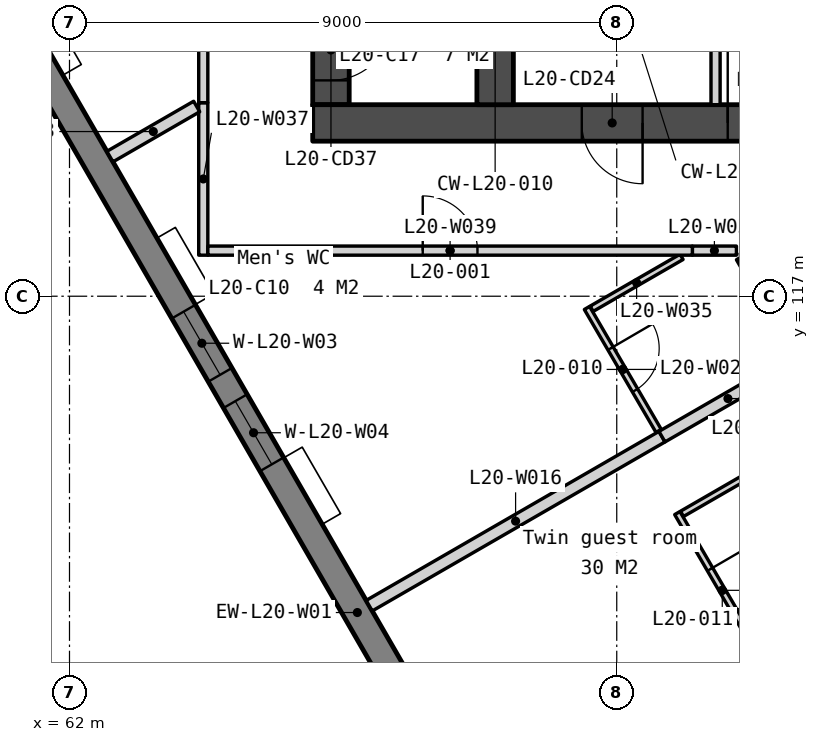
"""IFC4 building model, lengths in metres.
Left out: names, types, materials, properties, quantities, classifications, styles, units other than length and angle.
Written with IfcOpenShell. Run it as: python <this file> out.ifc"""

import sys

from ifc_helpers import new_model, si_unit, direction, frame, frame_2d, origin, place, context, subcontext, project, spatial, polyline, rectangle, outline, extrude, element, fill, save


model = new_model("IFC4")
c1 = context("Model", 3, precision=1e-05, world=origin(), true_north=direction((0.0, 1.0)))
c2 = subcontext(c1, "Body", "Model", "MODEL_VIEW")
j1 = project(units=[si_unit("LENGTHUNIT", "METRE"), si_unit("PLANEANGLEUNIT", "RADIAN")], contexts=[c1])
p1 = place(None, origin())
s1 = spatial("IfcSite", under=j1, at=p1, CompositionType="ELEMENT")
p2 = place(p1, origin())
s2 = spatial("IfcBuilding", under=s1, at=p2, CompositionType="ELEMENT")
p3 = place(p2, frame((0.0, 0.0, 85.3)))
s3 = spatial("IfcBuildingStorey", under=s2, at=p3, CompositionType="ELEMENT", Elevation=85.3)
p4 = place(p3, frame((66.3, 133.95, 0.0), z_axis=(0.0, 0.0, 1.0), x_axis=(0.0, -1.0, 0.0)))
e1 = element("IfcWall", 1, at=p4, inside=s3, PredefinedType="SOLIDWALL", context=c2, shape_type="SweptSolid", body=[
    extrude(rectangle(XDim=13.8, YDim=0.6, at=frame_2d((6.9, 0.0))), origin(), (0.0, 0.0, 1.0), 3.35),
])
p5 = place(p4, frame((0.6, 0.0, 0.0)))
e2 = element("IfcOpeningElement", 2, at=p5, cuts=e1, PredefinedType="OPENING", context=c2, shape_type="SweptSolid", body=[
    extrude(rectangle(XDim=1.1, YDim=2.1, at=frame_2d((0.55, 1.05))), frame((0.0, 0.31, 0.0), z_axis=(0.0, -1.0, 0.0), x_axis=(1.0, 0.0, 0.0)), (0.0, 0.0, 1.0), 0.62),
])
p6 = place(p4, frame((8.405, 0.0, 0.0)))
e3 = element("IfcOpeningElement", 3, at=p6, cuts=e1, PredefinedType="OPENING", context=c2, shape_type="SweptSolid", body=[
    extrude(rectangle(XDim=1.0, YDim=2.1, at=frame_2d((0.5, 1.05))), frame((0.0, 0.31, 0.0), z_axis=(0.0, -1.0, 0.0), x_axis=(1.0, 0.0, 0.0)), (0.0, 0.0, 1.0), 0.62),
])
p7 = place(p4, frame((10.355, 0.0, 0.0)))
e4 = element("IfcOpeningElement", 4, at=p7, cuts=e1, PredefinedType="OPENING", context=c2, shape_type="SweptSolid", body=[
    extrude(rectangle(XDim=1.0, YDim=2.1, at=frame_2d((0.5, 1.05))), frame((0.0, 0.31, 0.0), z_axis=(0.0, -1.0, 0.0), x_axis=(1.0, 0.0, 0.0)), (0.0, 0.0, 1.0), 0.62),
])
p8 = place(p4, frame((12.4, 0.0, 0.0)))
e5 = element("IfcOpeningElement", 5, at=p8, cuts=e1, PredefinedType="OPENING", context=c2, shape_type="SweptSolid", body=[
    extrude(rectangle(XDim=1.0, YDim=2.1, at=frame_2d((0.5, 1.05))), frame((0.0, 0.31, 0.0), z_axis=(0.0, -1.0, 0.0), x_axis=(1.0, 0.0, 0.0)), (0.0, 0.0, 1.0), 0.62),
])
p9 = place(p3, frame((66.0, 119.85, 0.0), z_axis=(0.0, 0.0, 1.0), x_axis=(1.0, 0.0, 0.0)))
e6 = element("IfcWall", 6, at=p9, inside=s3, PredefinedType="SOLIDWALL", context=c2, shape_type="SweptSolid", body=[
    extrude(rectangle(XDim=28.0, YDim=0.6, at=frame_2d((14.0, 0.0))), origin(), (0.0, 0.0, 1.0), 3.35),
])
p10 = place(p9, frame((6.825, 0.0, 0.0)))
e7 = element("IfcOpeningElement", 7, at=p10, cuts=e6, PredefinedType="OPENING", context=c2, shape_type="SweptSolid", body=[
    extrude(rectangle(XDim=1.8, YDim=2.1, at=frame_2d((0.9, 1.05))), frame((0.0, 0.31, 0.0), z_axis=(0.0, -1.0, 0.0), x_axis=(1.0, 0.0, 0.0)), (0.0, 0.0, 1.0), 0.62),
])
p11 = place(p9, frame((15.85, 0.0, 0.0)))
e8 = element("IfcOpeningElement", 8, at=p11, cuts=e6, PredefinedType="OPENING", context=c2, shape_type="SweptSolid", body=[
    extrude(rectangle(XDim=1.5, YDim=2.1, at=frame_2d((0.75, 1.05))), frame((0.0, 0.31, 0.0), z_axis=(0.0, -1.0, 0.0), x_axis=(1.0, 0.0, 0.0)), (0.0, 0.0, 1.0), 0.62),
])
p12 = place(p9, frame((19.375, 0.0, 0.0)))
e9 = element("IfcOpeningElement", 9, at=p12, cuts=e6, PredefinedType="OPENING", context=c2, shape_type="SweptSolid", body=[
    extrude(rectangle(XDim=1.8, YDim=2.1, at=frame_2d((0.9, 1.05))), frame((0.0, 0.31, 0.0), z_axis=(0.0, -1.0, 0.0), x_axis=(1.0, 0.0, 0.0)), (0.0, 0.0, 1.0), 0.62),
])
p13 = place(p9, frame((4.425, 0.0, 0.0)))
e10 = element("IfcOpeningElement", 10, at=p13, cuts=e6, PredefinedType="OPENING", context=c2, shape_type="SweptSolid", body=[
    extrude(rectangle(XDim=1.0, YDim=2.1, at=frame_2d((0.5, 1.05))), frame((0.0, 0.31, 0.0), z_axis=(0.0, -1.0, 0.0), x_axis=(1.0, 0.0, 0.0)), (0.0, 0.0, 1.0), 0.62),
])
p14 = place(p9, frame((9.783, 0.0, 0.0)))
e11 = element("IfcOpeningElement", 11, at=p14, cuts=e6, PredefinedType="OPENING", context=c2, shape_type="SweptSolid", body=[
    extrude(rectangle(XDim=1.0, YDim=2.1, at=frame_2d((0.5, 1.05))), frame((0.0, 0.31, 0.0), z_axis=(0.0, -1.0, 0.0), x_axis=(1.0, 0.0, 0.0)), (0.0, 0.0, 1.0), 0.62),
])
p15 = place(p9, frame((11.525, 0.0, 0.0)))
e12 = element("IfcOpeningElement", 12, at=p15, cuts=e6, PredefinedType="OPENING", context=c2, shape_type="SweptSolid", body=[
    extrude(rectangle(XDim=1.0, YDim=2.1, at=frame_2d((0.5, 1.05))), frame((0.0, 0.31, 0.0), z_axis=(0.0, -1.0, 0.0), x_axis=(1.0, 0.0, 0.0)), (0.0, 0.0, 1.0), 0.62),
])
p16 = place(p9, frame((13.658, 0.0, 0.0)))
e13 = element("IfcOpeningElement", 13, at=p16, cuts=e6, PredefinedType="OPENING", context=c2, shape_type="SweptSolid", body=[
    extrude(rectangle(XDim=1.0, YDim=2.1, at=frame_2d((0.5, 1.05))), frame((0.0, 0.31, 0.0), z_axis=(0.0, -1.0, 0.0), x_axis=(1.0, 0.0, 0.0)), (0.0, 0.0, 1.0), 0.62),
])
p17 = place(p9, frame((21.725, 0.0, 0.0)))
e14 = element("IfcOpeningElement", 14, at=p17, cuts=e6, PredefinedType="OPENING", context=c2, shape_type="SweptSolid", body=[
    extrude(rectangle(XDim=1.0, YDim=2.1, at=frame_2d((0.5, 1.05))), frame((0.0, 0.31, 0.0), z_axis=(0.0, -1.0, 0.0), x_axis=(1.0, 0.0, 0.0)), (0.0, 0.0, 1.0), 0.62),
])
p18 = place(p9, frame((23.425, 0.0, 0.0)))
e15 = element("IfcOpeningElement", 15, at=p18, cuts=e6, PredefinedType="OPENING", context=c2, shape_type="SweptSolid", body=[
    extrude(rectangle(XDim=1.0, YDim=2.1, at=frame_2d((0.5, 1.05))), frame((0.0, 0.31, 0.0), z_axis=(0.0, -1.0, 0.0), x_axis=(1.0, 0.0, 0.0)), (0.0, 0.0, 1.0), 0.62),
])
p19 = place(p3, frame((69.0, 122.25, 0.0), z_axis=(0.0, 0.0, 1.0), x_axis=(0.0, -1.0, 0.0)))
e16 = element("IfcWall", 16, at=p19, inside=s3, PredefinedType="SOLIDWALL", context=c2, shape_type="SweptSolid", body=[
    extrude(rectangle(XDim=2.1, YDim=0.6, at=frame_2d((1.05, 0.0))), origin(), (0.0, 0.0, 1.0), 3.35),
])
p20 = place(p3, frame((72.625, 122.25, 0.0), z_axis=(0.0, 0.0, 1.0), x_axis=(0.0, -1.0, 0.0)))
e17 = element("IfcWall", 17, at=p20, inside=s3, PredefinedType="PARTITIONING", context=c2, shape_type="SweptSolid", body=[
    extrude(rectangle(XDim=2.1, YDim=0.15, at=frame_2d((1.05, 0.0))), origin(), (0.0, 0.0, 1.0), 3.35),
])
p21 = place(p3, frame((56.073, 130.263, -0.15), z_axis=(0.0, 0.0, 1.0), x_axis=(0.500000478905, -0.866025127289, 0.0)))
e18 = element("IfcWall", 18, at=p21, inside=s3, PredefinedType="SOLIDWALL", context=c2, shape_type="SweptSolid", body=[
    extrude(outline(polyline([(42.643, 0.0), (42.643, 3.5), (0.0, 3.5), (0.0, 0.0), (42.643, 0.0)])), frame((0.0, 0.225, 0.0), z_axis=(0.0, -1.0, 0.0), x_axis=(1.0, 0.0, 0.0)), (0.0, 0.0, 1.0), 0.45),
])
p22 = place(p21, frame((7.079, 0.0, 1.05)))
e19 = element("IfcOpeningElement", 19, at=p22, cuts=e18, PredefinedType="OPENING", context=c2, shape_type="SweptSolid", body=[
    extrude(rectangle(XDim=1.2, YDim=1.5, at=frame_2d((0.6, 0.75))), frame((0.0, 0.235, 0.0), z_axis=(0.0, -1.0, 0.0), x_axis=(1.0, 0.0, 0.0)), (0.0, 0.0, 1.0), 0.47),
])
p23 = place(p21, frame((8.779, 0.0, 1.05)))
e20 = element("IfcOpeningElement", 20, at=p23, cuts=e18, PredefinedType="OPENING", context=c2, shape_type="SweptSolid", body=[
    extrude(rectangle(XDim=1.2, YDim=1.5, at=frame_2d((0.6, 0.75))), frame((0.0, 0.235, 0.0), z_axis=(0.0, -1.0, 0.0), x_axis=(1.0, 0.0, 0.0)), (0.0, 0.0, 1.0), 0.47),
])
p24 = place(p21, frame((15.607, 0.0, 1.05)))
e21 = element("IfcOpeningElement", 21, at=p24, cuts=e18, PredefinedType="OPENING", context=c2, shape_type="SweptSolid", body=[
    extrude(rectangle(XDim=1.2, YDim=1.5, at=frame_2d((0.6, 0.75))), frame((0.0, 0.235, 0.0), z_axis=(0.0, -1.0, 0.0), x_axis=(1.0, 0.0, 0.0)), (0.0, 0.0, 1.0), 0.47),
])
p25 = place(p21, frame((17.307, 0.0, 1.05)))
e22 = element("IfcOpeningElement", 22, at=p25, cuts=e18, PredefinedType="OPENING", context=c2, shape_type="SweptSolid", body=[
    extrude(rectangle(XDim=1.2, YDim=1.5, at=frame_2d((0.6, 0.75))), frame((0.0, 0.235, 0.0), z_axis=(0.0, -1.0, 0.0), x_axis=(1.0, 0.0, 0.0)), (0.0, 0.0, 1.0), 0.47),
])
p26 = place(p21, frame((24.136, 0.0, 1.05)))
e23 = element("IfcOpeningElement", 23, at=p26, cuts=e18, PredefinedType="OPENING", context=c2, shape_type="SweptSolid", body=[
    extrude(rectangle(XDim=1.2, YDim=1.5, at=frame_2d((0.6, 0.75))), frame((0.0, 0.235, 0.0), z_axis=(0.0, -1.0, 0.0), x_axis=(1.0, 0.0, 0.0)), (0.0, 0.0, 1.0), 0.47),
])
p27 = place(p21, frame((25.836, 0.0, 1.05)))
e24 = element("IfcOpeningElement", 24, at=p27, cuts=e18, PredefinedType="OPENING", context=c2, shape_type="SweptSolid", body=[
    extrude(rectangle(XDim=1.2, YDim=1.5, at=frame_2d((0.6, 0.75))), frame((0.0, 0.235, 0.0), z_axis=(0.0, -1.0, 0.0), x_axis=(1.0, 0.0, 0.0)), (0.0, 0.0, 1.0), 0.47),
])
p28 = place(p21, frame((32.665, 0.0, 1.05)))
e25 = element("IfcOpeningElement", 25, at=p28, cuts=e18, PredefinedType="OPENING", context=c2, shape_type="SweptSolid", body=[
    extrude(rectangle(XDim=1.2, YDim=1.5, at=frame_2d((0.6, 0.75))), frame((0.0, 0.235, 0.0), z_axis=(0.0, -1.0, 0.0), x_axis=(1.0, 0.0, 0.0)), (0.0, 0.0, 1.0), 0.47),
])
p29 = place(p21, frame((34.365, 0.0, 1.05)))
e26 = element("IfcOpeningElement", 26, at=p29, cuts=e18, PredefinedType="OPENING", context=c2, shape_type="SweptSolid", body=[
    extrude(rectangle(XDim=1.2, YDim=1.5, at=frame_2d((0.6, 0.75))), frame((0.0, 0.235, 0.0), z_axis=(0.0, -1.0, 0.0), x_axis=(1.0, 0.0, 0.0)), (0.0, 0.0, 1.0), 0.47),
])
p30 = place(p3, frame((71.996, 113.434, 0.0), z_axis=(0.0, 0.0, 1.0), x_axis=(0.50282251156, -0.864389681723, 0.0)))
e27 = element("IfcWall", 27, at=p30, inside=s3, PredefinedType="PARTITIONING", context=c2, shape_type="SweptSolid", body=[
    extrude(rectangle(XDim=2.94, YDim=0.1, at=frame_2d((1.47, 0.0))), origin(), (0.0, 0.0, 1.0), 3.35),
])
p31 = place(p30, frame((1.07, 0.0, 0.0)))
e28 = element("IfcOpeningElement", 28, at=p31, cuts=e27, PredefinedType="OPENING", context=c2, shape_type="SweptSolid", body=[
    extrude(rectangle(XDim=0.8, YDim=2.1, at=frame_2d((0.4, 1.05))), frame((0.0, 0.06, 0.0), z_axis=(0.0, -1.0, 0.0), x_axis=(1.0, 0.0, 0.0)), (0.0, 0.0, 1.0), 0.12),
])
p32 = place(p3, frame((66.929, 111.91, 0.0), z_axis=(0.0, 0.0, 1.0), x_axis=(0.866026912667, 0.49999738653, 0.0)))
e29 = element("IfcWall", 29, at=p32, inside=s3, PredefinedType="PARTITIONING", context=c2, shape_type="SweptSolid", body=[
    extrude(rectangle(XDim=5.56, YDim=0.2, at=frame_2d((2.78, 0.0))), origin(), (0.0, 0.0, 1.0), 3.35),
])
p33 = place(p3, frame((72.073, 113.42, 0.0), z_axis=(0.0, 0.0, 1.0), x_axis=(0.866047940603, 0.499960963054, 0.0)))
e30 = element("IfcWall", 30, at=p33, inside=s3, PredefinedType="PARTITIONING", context=c2, shape_type="SweptSolid", body=[
    extrude(rectangle(XDim=2.865, YDim=0.1, at=frame_2d((1.433, 0.0))), origin(), (0.0, 0.0, 1.0), 3.35),
])
p34 = place(p3, frame((70.51, 116.807, 0.0), z_axis=(0.0, 0.0, 1.0), x_axis=(0.503637463939, -0.863915102841, 0.0)))
e31 = element("IfcWall", 31, at=p34, inside=s3, PredefinedType="PARTITIONING", context=c2, shape_type="SweptSolid", body=[
    extrude(rectangle(XDim=2.34, YDim=0.1, at=frame_2d((1.17, 0.0))), origin(), (0.0, 0.0, 1.0), 3.35),
])
p35 = place(p34, frame((0.77, 0.0, 0.0)))
e32 = element("IfcOpeningElement", 32, at=p35, cuts=e31, PredefinedType="OPENING", context=c2, shape_type="SweptSolid", body=[
    extrude(rectangle(XDim=0.8, YDim=2.1, at=frame_2d((0.4, 1.05))), frame((0.0, 0.06, 0.0), z_axis=(0.0, -1.0, 0.0), x_axis=(1.0, 0.0, 0.0)), (0.0, 0.0, 1.0), 0.12),
])
p36 = place(p3, frame((71.744, 114.69, 0.0), z_axis=(0.0, 0.0, 1.0), x_axis=(0.865972946165, 0.500090848258, 0.0)))
e33 = element("IfcWall", 33, at=p36, inside=s3, PredefinedType="PARTITIONING", context=c2, shape_type="SweptSolid", body=[
    extrude(rectangle(XDim=2.505, YDim=0.2, at=frame_2d((1.252, 0.0))), origin(), (0.0, 0.0, 1.0), 3.35),
])
p37 = place(p3, frame((70.587, 116.794, 0.0), z_axis=(0.0, 0.0, 1.0), x_axis=(0.866026058841, 0.499998865407, 0.0)))
e34 = element("IfcWall", 34, at=p37, inside=s3, PredefinedType="PARTITIONING", context=c2, shape_type="SweptSolid", body=[
    extrude(rectangle(XDim=1.708, YDim=0.1, at=frame_2d((0.854, 0.0))), origin(), (0.0, 0.0, 1.0), 3.35),
])
p38 = place(p3, frame((64.2, 117.675, 0.0), z_axis=(0.0, 0.0, 1.0), x_axis=(0.0, 1.0, 0.0)))
e35 = element("IfcWall", 35, at=p38, inside=s3, PredefinedType="PARTITIONING", context=c2, shape_type="SweptSolid", body=[
    extrude(rectangle(XDim=2.508, YDim=0.15, at=frame_2d((1.254, 0.0))), origin(), (0.0, 0.0, 1.0), 3.35),
])
p39 = place(p3, frame((72.244, 117.75, 0.0), z_axis=(0.0, 0.0, 1.0), x_axis=(1.0, 0.0, 0.0)))
e36 = element("IfcWall", 36, at=p39, inside=s3, PredefinedType="PARTITIONING", context=c2, shape_type="SweptSolid", body=[
    extrude(rectangle(XDim=0.725, YDim=0.15, at=frame_2d((0.362, 0.0))), origin(), (0.0, 0.0, 1.0), 3.35),
])
p40 = place(p3, frame((64.275, 117.75, 0.0), z_axis=(0.0, 0.0, 1.0), x_axis=(1.0, 0.0, 0.0)))
e37 = element("IfcWall", 37, at=p40, inside=s3, PredefinedType="PARTITIONING", context=c2, shape_type="SweptSolid", body=[
    extrude(rectangle(XDim=7.969, YDim=0.15, at=frame_2d((3.984, 0.0))), origin(), (0.0, 0.0, 1.0), 3.35),
])
p41 = place(p40, frame((3.534, 0.0, 0.0)))
e38 = element("IfcOpeningElement", 38, at=p41, cuts=e37, PredefinedType="OPENING", context=c2, shape_type="SweptSolid", body=[
    extrude(rectangle(XDim=0.9, YDim=2.1, at=frame_2d((0.45, 1.05))), frame((0.0, 0.085, 0.0), z_axis=(0.0, -1.0, 0.0), x_axis=(1.0, 0.0, 0.0)), (0.0, 0.0, 1.0), 0.17),
])
p42 = place(p3, frame((73.033, 117.637, 0.0), z_axis=(0.0, 0.0, 1.0), x_axis=(0.500006788699, -0.866021484292, 0.0)))
e39 = element("IfcWall", 39, at=p42, inside=s3, PredefinedType="PARTITIONING", context=c2, shape_type="SweptSolid", body=[
    extrude(rectangle(XDim=1.908, YDim=0.15, at=frame_2d((0.954, 0.0))), origin(), (0.0, 0.0, 1.0), 3.35),
])
p43 = place(p3, frame((62.665, 119.296, 0.0), z_axis=(0.0, 0.0, 1.0), x_axis=(0.866101713734, 0.499867803992, 0.0)))
e40 = element("IfcWall", 40, at=p43, inside=s3, PredefinedType="PARTITIONING", context=c2, shape_type="SweptSolid", body=[
    extrude(rectangle(XDim=1.648, YDim=0.2, at=frame_2d((0.824, 0.0))), origin(), (0.0, 0.0, 1.0), 3.35),
])
p44 = place(p3, frame((64.2, 120.183, 0.0), z_axis=(0.0, 0.0, 1.0), x_axis=(0.0, 1.0, 0.0)))
e41 = element("IfcWall", 41, at=p44, inside=s3, PredefinedType="PARTITIONING", context=c2, shape_type="SweptSolid", body=[
    extrude(rectangle(XDim=6.392, YDim=0.15, at=frame_2d((3.196, 0.0))), origin(), (0.0, 0.0, 1.0), 3.35),
])
p45 = place(p10, origin())
e42 = element("IfcDoor", 42, at=p45, inside=s3, OperationType="DOUBLE_DOOR_DOUBLE_SWING", PredefinedType="DOOR", context=c2, shape_type="SweptSolid", body=[
    extrude(rectangle(XDim=1.8, YDim=2.1, at=frame_2d((0.9, 1.05))), frame((0.0, 0.025, 0.0), z_axis=(0.0, -1.0, 0.0), x_axis=(1.0, 0.0, 0.0)), (0.0, 0.0, 1.0), 0.05),
])
fill(e7, e42)
p46 = place(p13, origin())
e43 = element("IfcDoor", 43, at=p46, inside=s3, OperationType="SINGLE_SWING_RIGHT", PredefinedType="DOOR", context=c2, shape_type="SweptSolid", body=[
    extrude(rectangle(XDim=1.0, YDim=2.1, at=frame_2d((0.5, 1.05))), frame((0.0, 0.025, 0.0), z_axis=(0.0, -1.0, 0.0), x_axis=(1.0, 0.0, 0.0)), (0.0, 0.0, 1.0), 0.05),
])
fill(e10, e43)
p47 = place(p8, origin())
e44 = element("IfcDoor", 44, at=p47, inside=s3, OperationType="SINGLE_SWING_LEFT", PredefinedType="DOOR", context=c2, shape_type="SweptSolid", body=[
    extrude(rectangle(XDim=1.0, YDim=2.1, at=frame_2d((0.5, 1.05))), frame((0.0, 0.025, 0.0), z_axis=(0.0, -1.0, 0.0), x_axis=(1.0, 0.0, 0.0)), (0.0, 0.0, 1.0), 0.05),
])
fill(e5, e44)
p48 = place(p24, origin())
e45 = element("IfcWindow", 45, at=p48, inside=s3, PartitioningType="SINGLE_PANEL", PredefinedType="WINDOW", context=c2, shape_type="SweptSolid", body=[
    extrude(rectangle(XDim=1.2, YDim=1.5, at=frame_2d((0.6, 0.75))), frame((0.0, 0.03, 0.0), z_axis=(0.0, -1.0, 0.0), x_axis=(1.0, 0.0, 0.0)), (0.0, 0.0, 1.0), 0.06),
])
fill(e21, e45)
p49 = place(p25, origin())
e46 = element("IfcWindow", 46, at=p49, inside=s3, PartitioningType="SINGLE_PANEL", PredefinedType="WINDOW", context=c2, shape_type="SweptSolid", body=[
    extrude(rectangle(XDim=1.2, YDim=1.5, at=frame_2d((0.6, 0.75))), frame((0.0, 0.03, 0.0), z_axis=(0.0, -1.0, 0.0), x_axis=(1.0, 0.0, 0.0)), (0.0, 0.0, 1.0), 0.06),
])
fill(e22, e46)
p50 = place(p41, origin())
e47 = element("IfcDoor", 47, at=p50, inside=s3, OperationType="SINGLE_SWING_LEFT", PredefinedType="DOOR", context=c2, shape_type="SweptSolid", body=[
    extrude(rectangle(XDim=0.9, YDim=2.1, at=frame_2d((0.45, 1.05))), frame((0.0, 0.025, 0.0), z_axis=(0.0, -1.0, 0.0), x_axis=(1.0, 0.0, 0.0)), (0.0, 0.0, 1.0), 0.05),
])
fill(e38, e47)
p51 = place(p35, origin())
e48 = element("IfcDoor", 48, at=p51, inside=s3, OperationType="SINGLE_SWING_LEFT", PredefinedType="DOOR", context=c2, shape_type="SweptSolid", body=[
    extrude(rectangle(XDim=0.8, YDim=2.1, at=frame_2d((0.4, 1.05))), frame((0.0, 0.025, 0.0), z_axis=(0.0, -1.0, 0.0), x_axis=(1.0, 0.0, 0.0)), (0.0, 0.0, 1.0), 0.05),
])
fill(e32, e48)
p52 = place(p31, origin())
e49 = element("IfcDoor", 49, at=p52, inside=s3, OperationType="SINGLE_SWING_LEFT", PredefinedType="DOOR", context=c2, shape_type="SweptSolid", body=[
    extrude(rectangle(XDim=0.8, YDim=2.1, at=frame_2d((0.4, 1.05))), frame((0.0, 0.025, 0.0), z_axis=(0.0, -1.0, 0.0), x_axis=(1.0, 0.0, 0.0)), (0.0, 0.0, 1.0), 0.05),
])
fill(e28, e49)
save(model, sys.argv[1])
